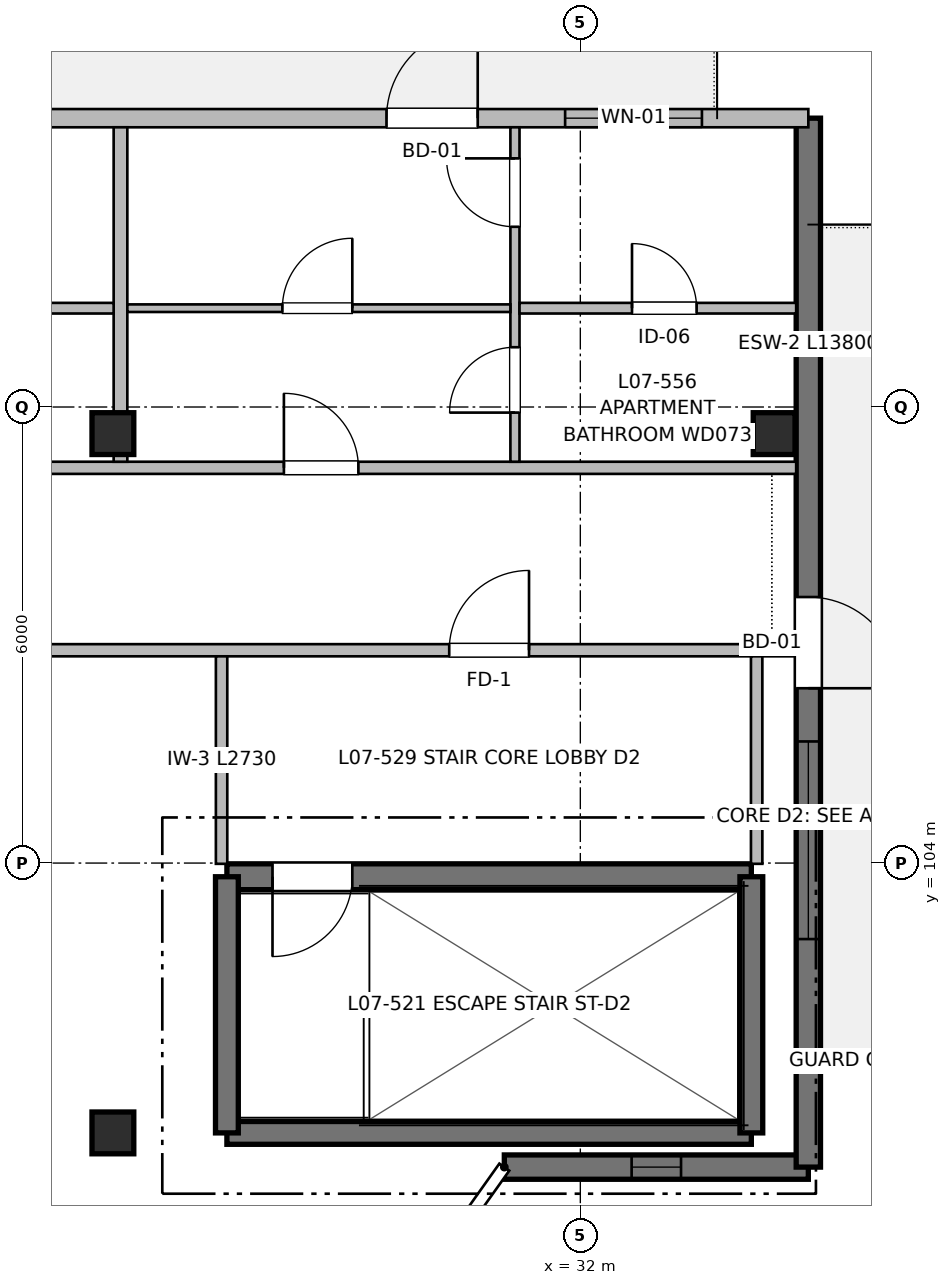
"""IFC4 building model, lengths in metres.
Left out: names, types, materials, properties, quantities, classifications, styles, units other than length and angle.
Written with IfcOpenShell. Run it as: python <this file> out.ifc"""

import sys

from ifc_helpers import new_model, si_unit, direction, frame, frame_2d, origin, origin_2d, place, context, subcontext, project, spatial, rectangle, extrude, element, fill, save


model = new_model("IFC4")
c1 = context("Model", 3, precision=1e-05, world=origin(), true_north=direction((0.0, 1.0)))
c2 = subcontext(c1, "Body", "Model", "MODEL_VIEW")
j1 = project(units=[si_unit("LENGTHUNIT", "METRE"), si_unit("PLANEANGLEUNIT", "RADIAN")], contexts=[c1])
p1 = place(None, origin())
s1 = spatial("IfcSite", under=j1, at=p1, CompositionType="ELEMENT")
p2 = place(p1, origin())
s2 = spatial("IfcBuilding", under=s1, at=p2, CompositionType="ELEMENT")
p3 = place(p2, frame((0.0, 0.0, 23.36)))
s3 = spatial("IfcBuildingStorey", under=s2, at=p3, CompositionType="ELEMENT", Elevation=23.36)
for number, where, z_axis, x_axis in (
    (1, (25.85, 100.45, 0.0), (0.0, 0.0, 1.0), (1.0, 0.0, 0.0)),
    (2, (25.85, 109.65, 0.0), (0.0, 0.0, 1.0), (1.0, 0.0, 0.0)),
    (3, (34.55, 109.65, 0.0), (0.0, 0.0, 1.0), (1.0, 0.0, 0.0)),
):
    element("IfcColumn", number, at=place(p3, frame(where, z_axis=z_axis, x_axis=x_axis)), inside=s3, PredefinedType="COLUMN", context=c2, shape_type="SweptSolid", body=[
        extrude(rectangle(XDim=0.55, YDim=0.55, at=origin_2d()), origin(), (0.0, 0.0, 1.0), 3.2),
    ])
p4 = place(p3, frame((27.35, 100.45, 0.0), z_axis=(0.0, 0.0, 1.0), x_axis=(1.0, 0.0, 0.0)))
e4 = element("IfcWall", 4, at=p4, inside=s3, PredefinedType="SHEAR", context=c2, shape_type="SweptSolid", body=[
    extrude(rectangle(XDim=6.9, YDim=0.3, at=frame_2d((3.45, 0.0))), origin(), (0.0, 0.0, 1.0), 3.2),
])
p5 = place(p3, frame((34.25, 103.82, 0.0), z_axis=(0.0, 0.0, 1.0), x_axis=(-1.0, 0.0, 0.0)))
e5 = element("IfcWall", 5, at=p5, inside=s3, PredefinedType="SHEAR", context=c2, shape_type="SweptSolid", body=[
    extrude(rectangle(XDim=6.9, YDim=0.34, at=frame_2d((3.45, 0.0))), origin(), (0.0, 0.0, 1.0), 3.2),
])
p6 = place(p5, frame((5.25, 0.0, 0.0)))
e6 = element("IfcOpeningElement", 6, at=p6, cuts=e5, PredefinedType="OPENING", context=c2, shape_type="SweptSolid", body=[
    extrude(rectangle(XDim=1.05, YDim=2.15, at=frame_2d((0.525, 1.075))), frame((0.0, 0.18, 0.0), z_axis=(0.0, -1.0, 0.0), x_axis=(1.0, 0.0, 0.0)), (0.0, 0.0, 1.0), 0.36),
])
for number, where, z_axis, x_axis in (
    (7, (27.35, 103.82, 0.0), (0.0, 0.0, 1.0), (0.0, -1.0, 0.0)),
    (8, (34.25, 100.45, 0.0), (0.0, 0.0, 1.0), (0.0, 1.0, 0.0)),
):
    element("IfcWall", number, at=place(p3, frame(where, z_axis=z_axis, x_axis=x_axis)), inside=s3, PredefinedType="SHEAR", context=c2, shape_type="SweptSolid", body=[
        extrude(rectangle(XDim=3.37, YDim=0.3, at=frame_2d((1.685, 0.0))), origin(), (0.0, 0.0, 1.0), 3.2),
    ])
p7 = place(p3, frame((35.0, 100.0, 0.0), z_axis=(0.0, 0.0, 1.0), x_axis=(-1.0, 0.0, 0.0)))
e9 = element("IfcWall", 9, at=p7, inside=s3, PredefinedType="SHEAR", context=c2, shape_type="SweptSolid", body=[
    extrude(rectangle(XDim=4.0, YDim=0.32, at=frame_2d((2.0, 0.0))), origin(), (0.0, 0.0, 1.0), 2.98),
])
p8 = place(p7, frame((1.675, 0.0, 0.9)))
e10 = element("IfcOpeningElement", 10, at=p8, cuts=e9, PredefinedType="OPENING", context=c2, shape_type="SweptSolid", body=[
    extrude(rectangle(XDim=0.65, YDim=0.95, at=frame_2d((0.325, 0.475))), frame((0.0, 0.17, 0.0), z_axis=(0.0, -1.0, 0.0), x_axis=(1.0, 0.0, 0.0)), (0.0, 0.0, 1.0), 0.34),
])
p9 = place(p3, frame((35.0, 113.8, 0.0), z_axis=(0.0, 0.0, 1.0), x_axis=(0.0, -1.0, 0.0)))
e11 = element("IfcWall", 11, at=p9, inside=s3, PredefinedType="SHEAR", context=c2, shape_type="SweptSolid", body=[
    extrude(rectangle(XDim=13.8, YDim=0.32, at=frame_2d((6.9, 0.0))), origin(), (0.0, 0.0, 1.0), 2.98),
])
p10 = place(p9, frame((6.3, 0.0, 0.0)))
e12 = element("IfcOpeningElement", 12, at=p10, cuts=e11, PredefinedType="OPENING", context=c2, shape_type="SweptSolid", body=[
    extrude(rectangle(XDim=1.2, YDim=2.2, at=frame_2d((0.6, 1.1))), frame((0.0, 0.17, 0.0), z_axis=(0.0, -1.0, 0.0), x_axis=(1.0, 0.0, 0.0)), (0.0, 0.0, 1.0), 0.34),
])
p11 = place(p9, frame((8.2, 0.0, 0.67)))
e13 = element("IfcOpeningElement", 13, at=p11, cuts=e11, PredefinedType="OPENING", context=c2, shape_type="SweptSolid", body=[
    extrude(rectangle(XDim=2.6, YDim=1.55, at=frame_2d((1.3, 0.775))), frame((0.0, 0.17, 0.0), z_axis=(0.0, -1.0, 0.0), x_axis=(1.0, 0.0, 0.0)), (0.0, 0.0, 1.0), 0.34),
])
p12 = place(p3, frame((8.0, 113.8, 0.0), z_axis=(0.0, 0.0, 1.0), x_axis=(1.0, 0.0, 0.0)))
e14 = element("IfcWall", 14, at=p12, inside=s3, PredefinedType="SOLIDWALL", context=c2, shape_type="SweptSolid", body=[
    extrude(rectangle(XDim=27.0, YDim=0.24, at=frame_2d((13.5, 0.0))), origin(), (0.0, 0.0, 1.0), 2.98),
])
p13 = place(p12, frame((3.45, 0.0, 0.0)))
e15 = element("IfcOpeningElement", 15, at=p13, cuts=e14, PredefinedType="OPENING", context=c2, shape_type="SweptSolid", body=[
    extrude(rectangle(XDim=1.2, YDim=2.2, at=frame_2d((0.6, 1.1))), frame((0.0, 0.13, 0.0), z_axis=(0.0, -1.0, 0.0), x_axis=(1.0, 0.0, 0.0)), (0.0, 0.0, 1.0), 0.26),
])
p14 = place(p12, frame((5.8, 0.0, 0.67)))
e16 = element("IfcOpeningElement", 16, at=p14, cuts=e14, PredefinedType="OPENING", context=c2, shape_type="SweptSolid", body=[
    extrude(rectangle(XDim=2.6, YDim=1.55, at=frame_2d((1.3, 0.775))), frame((0.0, 0.13, 0.0), z_axis=(0.0, -1.0, 0.0), x_axis=(1.0, 0.0, 0.0)), (0.0, 0.0, 1.0), 0.26),
])
p15 = place(p12, frame((12.95, 0.0, 0.62)))
e17 = element("IfcOpeningElement", 17, at=p15, cuts=e14, PredefinedType="OPENING", context=c2, shape_type="SweptSolid", body=[
    extrude(rectangle(XDim=1.1, YDim=1.6, at=frame_2d((0.55, 0.8))), frame((0.0, 0.13, 0.0), z_axis=(0.0, -1.0, 0.0), x_axis=(1.0, 0.0, 0.0)), (0.0, 0.0, 1.0), 0.26),
])
p16 = place(p12, frame((21.45, 0.0, 0.0)))
e18 = element("IfcOpeningElement", 18, at=p16, cuts=e14, PredefinedType="OPENING", context=c2, shape_type="SweptSolid", body=[
    extrude(rectangle(XDim=1.2, YDim=2.2, at=frame_2d((0.6, 1.1))), frame((0.0, 0.13, 0.0), z_axis=(0.0, -1.0, 0.0), x_axis=(1.0, 0.0, 0.0)), (0.0, 0.0, 1.0), 0.26),
])
p17 = place(p12, frame((23.8, 0.0, 0.72)))
e19 = element("IfcOpeningElement", 19, at=p17, cuts=e14, PredefinedType="OPENING", context=c2, shape_type="SweptSolid", body=[
    extrude(rectangle(XDim=1.8, YDim=1.5, at=frame_2d((0.9, 0.75))), frame((0.0, 0.13, 0.0), z_axis=(0.0, -1.0, 0.0), x_axis=(1.0, 0.0, 0.0)), (0.0, 0.0, 1.0), 0.26),
])
p18 = place(p12, frame((15.305, 0.0, 0.82)))
e20 = element("IfcOpeningElement", 20, at=p18, cuts=e14, PredefinedType="OPENING", context=c2, shape_type="SweptSolid", body=[
    extrude(rectangle(XDim=1.5, YDim=1.4, at=frame_2d((0.75, 0.7))), frame((0.0, 0.13, 0.0), z_axis=(0.0, -1.0, 0.0), x_axis=(1.0, 0.0, 0.0)), (0.0, 0.0, 1.0), 0.26),
])
p19 = place(p3, frame((17.2, 106.8, 0.0), z_axis=(0.0, 0.0, 1.0), x_axis=(1.0, 0.0, 0.0)))
e21 = element("IfcWall", 21, at=p19, inside=s3, PredefinedType="PARTITIONING", context=c2, shape_type="SweptSolid", body=[
    extrude(rectangle(XDim=17.64, YDim=0.16, at=frame_2d((8.82, 0.0))), origin(), (0.0, 0.0, 1.0), 2.935),
])
p20 = place(p19, frame((13.075, 0.0, 0.0)))
e22 = element("IfcOpeningElement", 22, at=p20, cuts=e21, PredefinedType="OPENING", context=c2, shape_type="SweptSolid", body=[
    extrude(rectangle(XDim=1.05, YDim=2.15, at=frame_2d((0.525, 1.075))), frame((0.0, 0.09, 0.0), z_axis=(0.0, -1.0, 0.0), x_axis=(1.0, 0.0, 0.0)), (0.0, 0.0, 1.0), 0.18),
])
p21 = place(p3, frame((8.16, 109.2, 0.0), z_axis=(0.0, 0.0, 1.0), x_axis=(1.0, 0.0, 0.0)))
e23 = element("IfcWall", 23, at=p21, inside=s3, PredefinedType="PARTITIONING", context=c2, shape_type="SweptSolid", body=[
    extrude(rectangle(XDim=26.68, YDim=0.16, at=frame_2d((13.34, 0.0))), origin(), (0.0, 0.0, 1.0), 2.935),
])
p22 = place(p21, frame((2.06, 0.0, 0.0)))
e24 = element("IfcOpeningElement", 24, at=p22, cuts=e23, PredefinedType="OPENING", context=c2, shape_type="SweptSolid", body=[
    extrude(rectangle(XDim=0.98, YDim=2.15, at=frame_2d((0.49, 1.075))), frame((0.0, 0.09, 0.0), z_axis=(0.0, -1.0, 0.0), x_axis=(1.0, 0.0, 0.0)), (0.0, 0.0, 1.0), 0.18),
])
p23 = place(p21, frame((11.02, 0.0, 0.0)))
e25 = element("IfcOpeningElement", 25, at=p23, cuts=e23, PredefinedType="OPENING", context=c2, shape_type="SweptSolid", body=[
    extrude(rectangle(XDim=0.98, YDim=2.15, at=frame_2d((0.49, 1.075))), frame((0.0, 0.09, 0.0), z_axis=(0.0, -1.0, 0.0), x_axis=(1.0, 0.0, 0.0)), (0.0, 0.0, 1.0), 0.18),
])
p24 = place(p21, frame((19.94, 0.0, 0.0)))
e26 = element("IfcOpeningElement", 26, at=p24, cuts=e23, PredefinedType="OPENING", context=c2, shape_type="SweptSolid", body=[
    extrude(rectangle(XDim=0.98, YDim=2.15, at=frame_2d((0.49, 1.075))), frame((0.0, 0.09, 0.0), z_axis=(0.0, -1.0, 0.0), x_axis=(1.0, 0.0, 0.0)), (0.0, 0.0, 1.0), 0.18),
])
for number, where, z_axis, x_axis in (
    (27, (27.28, 103.99, 0.0), (0.0, 0.0, 1.0), (0.0, 1.0, 0.0)),
    (28, (34.32, 103.99, 0.0), (0.0, 0.0, 1.0), (0.0, 1.0, 0.0)),
):
    element("IfcWall", number, at=place(p3, frame(where, z_axis=z_axis, x_axis=x_axis)), inside=s3, PredefinedType="PARTITIONING", context=c2, shape_type="SweptSolid", body=[
        extrude(rectangle(XDim=2.73, YDim=0.15, at=frame_2d((1.365, 0.0))), origin(), (0.0, 0.0, 1.0), 2.935),
    ])
p25 = place(p3, frame((25.95, 109.28, 0.0), z_axis=(0.0, 0.0, 1.0), x_axis=(0.0, 1.0, 0.0)))
e29 = element("IfcWall", 29, at=p25, inside=s3, PredefinedType="PARTITIONING", context=c2, shape_type="SweptSolid", body=[
    extrude(rectangle(XDim=4.4, YDim=0.18, at=frame_2d((2.2, 0.0))), origin(), (0.0, 0.0, 1.0), 2.935),
])
p26 = place(p3, frame((22.26, 111.3, 0.0), z_axis=(0.0, 0.0, 1.0), x_axis=(1.0, 0.0, 0.0)))
e30 = element("IfcWall", 30, at=p26, inside=s3, PredefinedType="PARTITIONING", context=c2, shape_type="SweptSolid", body=[
    extrude(rectangle(XDim=3.6, YDim=0.14, at=frame_2d((1.8, 0.0))), origin(), (0.0, 0.0, 1.0), 2.935),
])
p27 = place(p26, frame((1.464, 0.0, 0.0)))
e31 = element("IfcOpeningElement", 31, at=p27, cuts=e30, PredefinedType="OPENING", context=c2, shape_type="SweptSolid", body=[
    extrude(rectangle(XDim=0.85, YDim=2.05, at=frame_2d((0.425, 1.025))), frame((0.0, 0.08, 0.0), z_axis=(0.0, -1.0, 0.0), x_axis=(1.0, 0.0, 0.0)), (0.0, 0.0, 1.0), 0.16),
])
p28 = place(p3, frame((31.14, 109.28, 0.0), z_axis=(0.0, 0.0, 1.0), x_axis=(0.0, 1.0, 0.0)))
e32 = element("IfcWall", 32, at=p28, inside=s3, PredefinedType="PARTITIONING", context=c2, shape_type="SweptSolid", body=[
    extrude(rectangle(XDim=4.4, YDim=0.12, at=frame_2d((2.2, 0.0))), origin(), (0.0, 0.0, 1.0), 2.935),
])
p29 = place(p28, frame((0.646, 0.0, 0.0)))
e33 = element("IfcOpeningElement", 33, at=p29, cuts=e32, PredefinedType="OPENING", context=c2, shape_type="SweptSolid", body=[
    extrude(rectangle(XDim=0.86, YDim=2.1, at=frame_2d((0.43, 1.05))), frame((0.0, 0.07, 0.0), z_axis=(0.0, -1.0, 0.0), x_axis=(1.0, 0.0, 0.0)), (0.0, 0.0, 1.0), 0.14),
])
p30 = place(p28, frame((3.091, 0.0, 0.0)))
e34 = element("IfcOpeningElement", 34, at=p30, cuts=e32, PredefinedType="OPENING", context=c2, shape_type="SweptSolid", body=[
    extrude(rectangle(XDim=0.9, YDim=2.1, at=frame_2d((0.45, 1.05))), frame((0.0, 0.07, 0.0), z_axis=(0.0, -1.0, 0.0), x_axis=(1.0, 0.0, 0.0)), (0.0, 0.0, 1.0), 0.14),
])
p31 = place(p3, frame((31.2, 111.3, 0.0), z_axis=(0.0, 0.0, 1.0), x_axis=(1.0, 0.0, 0.0)))
e35 = element("IfcWall", 35, at=p31, inside=s3, PredefinedType="PARTITIONING", context=c2, shape_type="SweptSolid", body=[
    extrude(rectangle(XDim=3.64, YDim=0.14, at=frame_2d((1.82, 0.0))), origin(), (0.0, 0.0, 1.0), 2.935),
])
p32 = place(p31, frame((1.48, 0.0, 0.0)))
e36 = element("IfcOpeningElement", 36, at=p32, cuts=e35, PredefinedType="OPENING", context=c2, shape_type="SweptSolid", body=[
    extrude(rectangle(XDim=0.85, YDim=2.05, at=frame_2d((0.425, 1.025))), frame((0.0, 0.08, 0.0), z_axis=(0.0, -1.0, 0.0), x_axis=(1.0, 0.0, 0.0)), (0.0, 0.0, 1.0), 0.16),
])
p33 = place(p3, frame((26.04, 111.3, 0.0), z_axis=(0.0, 0.0, 1.0), x_axis=(1.0, 0.0, 0.0)))
e37 = element("IfcWall", 37, at=p33, inside=s3, PredefinedType="PARTITIONING", context=c2, shape_type="SweptSolid", body=[
    extrude(rectangle(XDim=5.04, YDim=0.1, at=frame_2d((2.52, 0.0))), origin(), (0.0, 0.0, 1.0), 2.935),
])
p34 = place(p33, frame((2.04, 0.0, 0.0)))
e38 = element("IfcOpeningElement", 38, at=p34, cuts=e37, PredefinedType="OPENING", context=c2, shape_type="SweptSolid", body=[
    extrude(rectangle(XDim=0.92, YDim=2.1, at=frame_2d((0.46, 1.05))), frame((0.0, 0.06, 0.0), z_axis=(0.0, -1.0, 0.0), x_axis=(1.0, 0.0, 0.0)), (0.0, 0.0, 1.0), 0.12),
])
p35 = place(p6, origin())
e39 = element("IfcDoor", 39, at=p35, inside=s3, OperationType="SINGLE_SWING_RIGHT", PredefinedType="DOOR", context=c2, shape_type="SweptSolid", body=[
    extrude(rectangle(XDim=1.05, YDim=2.15, at=frame_2d((0.525, 1.075))), frame((0.0, 0.025, 0.0), z_axis=(0.0, -1.0, 0.0), x_axis=(1.0, 0.0, 0.0)), (0.0, 0.0, 1.0), 0.05),
])
fill(e6, e39)
p36 = place(p8, origin())
e40 = element("IfcWindow", 40, at=p36, inside=s3, PartitioningType="SINGLE_PANEL", PredefinedType="WINDOW", context=c2, shape_type="SweptSolid", body=[
    extrude(rectangle(XDim=0.65, YDim=0.95, at=frame_2d((0.325, 0.475))), frame((0.0, 0.03, 0.0), z_axis=(0.0, -1.0, 0.0), x_axis=(1.0, 0.0, 0.0)), (0.0, 0.0, 1.0), 0.06),
])
fill(e10, e40)
p37 = place(p10, origin())
e41 = element("IfcDoor", 41, at=p37, inside=s3, OperationType="SINGLE_SWING_RIGHT", PredefinedType="DOOR", context=c2, shape_type="SweptSolid", body=[
    extrude(rectangle(XDim=1.2, YDim=2.2, at=frame_2d((0.6, 1.1))), frame((0.0, 0.025, 0.0), z_axis=(0.0, -1.0, 0.0), x_axis=(1.0, 0.0, 0.0)), (0.0, 0.0, 1.0), 0.05),
])
fill(e12, e41)
p38 = place(p11, origin())
e42 = element("IfcWindow", 42, at=p38, inside=s3, PartitioningType="SINGLE_PANEL", PredefinedType="WINDOW", context=c2, shape_type="SweptSolid", body=[
    extrude(rectangle(XDim=2.6, YDim=1.55, at=frame_2d((1.3, 0.775))), frame((0.0, 0.03, 0.0), z_axis=(0.0, -1.0, 0.0), x_axis=(1.0, 0.0, 0.0)), (0.0, 0.0, 1.0), 0.06),
])
fill(e13, e42)
p39 = place(p16, origin())
e43 = element("IfcDoor", 43, at=p39, inside=s3, OperationType="SINGLE_SWING_RIGHT", PredefinedType="DOOR", context=c2, shape_type="SweptSolid", body=[
    extrude(rectangle(XDim=1.2, YDim=2.2, at=frame_2d((0.6, 1.1))), frame((0.0, 0.025, 0.0), z_axis=(0.0, -1.0, 0.0), x_axis=(1.0, 0.0, 0.0)), (0.0, 0.0, 1.0), 0.05),
])
fill(e18, e43)
p40 = place(p17, origin())
e44 = element("IfcWindow", 44, at=p40, inside=s3, PartitioningType="SINGLE_PANEL", PredefinedType="WINDOW", context=c2, shape_type="SweptSolid", body=[
    extrude(rectangle(XDim=1.8, YDim=1.5, at=frame_2d((0.9, 0.75))), frame((0.0, 0.03, 0.0), z_axis=(0.0, -1.0, 0.0), x_axis=(1.0, 0.0, 0.0)), (0.0, 0.0, 1.0), 0.06),
])
fill(e19, e44)
p41 = place(p20, origin())
e45 = element("IfcDoor", 45, at=p41, inside=s3, OperationType="SINGLE_SWING_RIGHT", PredefinedType="DOOR", context=c2, shape_type="SweptSolid", body=[
    extrude(rectangle(XDim=1.05, YDim=2.15, at=frame_2d((0.525, 1.075))), frame((0.0, 0.025, 0.0), z_axis=(0.0, -1.0, 0.0), x_axis=(1.0, 0.0, 0.0)), (0.0, 0.0, 1.0), 0.05),
])
fill(e22, e45)
p42 = place(p24, origin())
e46 = element("IfcDoor", 46, at=p42, inside=s3, OperationType="SINGLE_SWING_LEFT", PredefinedType="DOOR", context=c2, shape_type="SweptSolid", body=[
    extrude(rectangle(XDim=0.98, YDim=2.15, at=frame_2d((0.49, 1.075))), frame((0.0, 0.025, 0.0), z_axis=(0.0, -1.0, 0.0), x_axis=(1.0, 0.0, 0.0)), (0.0, 0.0, 1.0), 0.05),
])
fill(e26, e46)
p43 = place(p34, origin())
e47 = element("IfcDoor", 47, at=p43, inside=s3, OperationType="SINGLE_SWING_RIGHT", PredefinedType="DOOR", context=c2, shape_type="SweptSolid", body=[
    extrude(rectangle(XDim=0.92, YDim=2.1, at=frame_2d((0.46, 1.05))), frame((0.0, 0.025, 0.0), z_axis=(0.0, -1.0, 0.0), x_axis=(1.0, 0.0, 0.0)), (0.0, 0.0, 1.0), 0.05),
])
fill(e38, e47)
p44 = place(p29, origin())
e48 = element("IfcDoor", 48, at=p44, inside=s3, OperationType="SINGLE_SWING_LEFT", PredefinedType="DOOR", context=c2, shape_type="SweptSolid", body=[
    extrude(rectangle(XDim=0.86, YDim=2.1, at=frame_2d((0.43, 1.05))), frame((0.0, 0.025, 0.0), z_axis=(0.0, -1.0, 0.0), x_axis=(1.0, 0.0, 0.0)), (0.0, 0.0, 1.0), 0.05),
])
fill(e33, e48)
p45 = place(p30, origin())
e49 = element("IfcDoor", 49, at=p45, inside=s3, OperationType="SINGLE_SWING_RIGHT", PredefinedType="DOOR", context=c2, shape_type="SweptSolid", body=[
    extrude(rectangle(XDim=0.9, YDim=2.1, at=frame_2d((0.45, 1.05))), frame((0.0, 0.025, 0.0), z_axis=(0.0, -1.0, 0.0), x_axis=(1.0, 0.0, 0.0)), (0.0, 0.0, 1.0), 0.05),
])
fill(e34, e49)
p46 = place(p32, origin())
e50 = element("IfcDoor", 50, at=p46, inside=s3, OperationType="SINGLE_SWING_LEFT", PredefinedType="DOOR", context=c2, shape_type="SweptSolid", body=[
    extrude(rectangle(XDim=0.85, YDim=2.05, at=frame_2d((0.425, 1.025))), frame((0.0, 0.025, 0.0), z_axis=(0.0, -1.0, 0.0), x_axis=(1.0, 0.0, 0.0)), (0.0, 0.0, 1.0), 0.05),
])
fill(e36, e50)
save(model, sys.argv[1])
